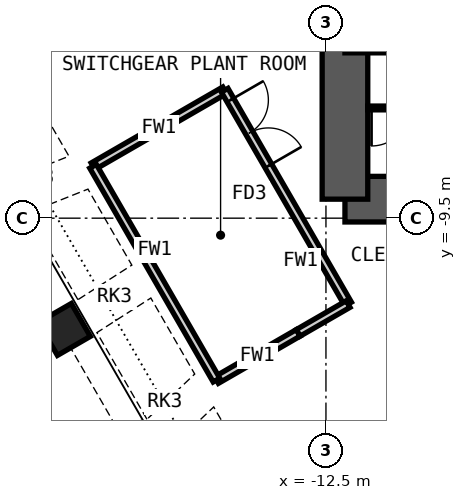
"""IFC4 building model, lengths in metres.
Left out: names, types, materials, properties, quantities, classifications, styles, units other than length and angle.
Written with IfcOpenShell. Run it as: python <this file> out.ifc"""

import sys

from ifc_helpers import new_model, si_unit, direction, frame, frame_2d, origin, origin_2d, place, context, subcontext, project, spatial, rectangle, hollow_rectangle, extrude, clip, halfspace, element, fill, save


model = new_model("IFC4")
c1 = context("Model", 3, precision=1e-05, world=origin(), true_north=direction((0.0, 1.0)))
c2 = subcontext(c1, "Body", "Model", "MODEL_VIEW")
j1 = project(units=[si_unit("LENGTHUNIT", "METRE"), si_unit("PLANEANGLEUNIT", "RADIAN")], contexts=[c1])
p1 = place(None, origin())
s1 = spatial("IfcSite", under=j1, at=p1, CompositionType="ELEMENT")
p2 = place(p1, origin())
s2 = spatial("IfcBuilding", under=s1, at=p2, CompositionType="ELEMENT")
p3 = place(p2, frame((0.0, 0.0, 256.0)))
s3 = spatial("IfcBuildingStorey", under=s2, at=p3, CompositionType="ELEMENT", Elevation=256.0)
p4 = place(p3, frame((-17.566, -15.574, 0.0), z_axis=(0.235339962254, 0.223022528836, 0.94597888655), x_axis=(0.250715543891, 0.9264441464, -0.280789885237)))
e1 = element("IfcColumn", 1, at=p4, inside=s3, PredefinedType="COLUMN", context=c2, shape_type="Clipping", body=[
    clip(clip(extrude(hollow_rectangle(XDim=1.0, YDim=1.0, WallThickness=0.08, at=origin_2d()), origin(), (0.0, 0.0, 1.0), 6.343), halfspace(frame((0.0, 0.0, 0.175), z_axis=(0.0, 0.0, -1.0), x_axis=(0.0, -1.0, 0.0)), False)), halfspace(frame((0.0, 0.0, 6.167), z_axis=(0.0, 0.0, 1.0), x_axis=(0.0, 1.0, 0.0)), False)),
])
p5 = place(p3, frame((-19.383, -12.428, 0.0), z_axis=(0.266443552396, 0.170835747197, 0.948589996187), x_axis=(0.421684474575, 0.864320218179, -0.274103565008)))
e2 = element("IfcColumn", 2, at=p5, inside=s3, PredefinedType="COLUMN", context=c2, shape_type="Clipping", body=[
    clip(clip(extrude(hollow_rectangle(XDim=1.0, YDim=1.0, WallThickness=0.08, at=origin_2d()), origin(), (0.0, 0.0, 1.0), 6.325), halfspace(frame((0.0, 0.0, 0.16), z_axis=(0.0, 0.0, -1.0), x_axis=(0.0, -1.0, 0.0)), False)), halfspace(frame((0.0, 0.0, 6.165), z_axis=(0.0, 0.0, 1.0), x_axis=(0.0, 1.0, 0.0)), False)),
])
p6 = place(p3, frame((-21.2, -9.281, 0.0), z_axis=(0.296649273987, 0.117957900575, 0.947673541857), x_axis=(0.577882690595, 0.767864214795, -0.276470872876)))
e3 = element("IfcColumn", 3, at=p6, inside=s3, PredefinedType="COLUMN", context=c2, shape_type="Clipping", body=[
    clip(clip(extrude(hollow_rectangle(XDim=1.0, YDim=1.0, WallThickness=0.08, at=origin_2d()), origin(), (0.0, 0.0, 1.0), 6.331), halfspace(frame((0.0, 0.0, 0.174), z_axis=(0.0, 0.0, -1.0), x_axis=(0.0, -1.0, 0.0)), False)), halfspace(frame((0.0, 0.0, 6.157), z_axis=(0.0, 0.0, 1.0), x_axis=(0.0, 1.0, 0.0)), False)),
])
p7 = place(p3, frame((-12.0, -9.0, 0.0), z_axis=(0.0, 0.0, 1.0), x_axis=(1.0, 0.0, 0.0)))
e4 = element("IfcWall", 4, at=p7, inside=s3, PredefinedType="SHEAR", context=c2, shape_type="SweptSolid", body=[
    extrude(rectangle(XDim=24.0, YDim=1.2, at=frame_2d((12.0, 0.0))), origin(), (0.0, 0.0, 1.0), 6.0),
])
p8 = place(p7, frame((1.35, 0.0, 0.0)))
e5 = element("IfcOpeningElement", 5, at=p8, cuts=e4, PredefinedType="OPENING", context=c2, shape_type="SweptSolid", body=[
    extrude(rectangle(XDim=1.0, YDim=2.1, at=frame_2d((0.5, 1.05))), frame((0.0, 0.61, 0.0), z_axis=(0.0, -1.0, 0.0), x_axis=(1.0, 0.0, 0.0)), (0.0, 0.0, 1.0), 1.22),
])
p9 = place(p7, frame((5.325, 0.0, 0.0)))
e6 = element("IfcOpeningElement", 6, at=p9, cuts=e4, PredefinedType="OPENING", context=c2, shape_type="SweptSolid", body=[
    extrude(rectangle(XDim=1.15, YDim=2.1, at=frame_2d((0.575, 1.05))), frame((0.0, 0.61, 0.0), z_axis=(0.0, -1.0, 0.0), x_axis=(1.0, 0.0, 0.0)), (0.0, 0.0, 1.0), 1.22),
])
p10 = place(p7, frame((12.6, 0.0, 0.0)))
e7 = element("IfcOpeningElement", 7, at=p10, cuts=e4, PredefinedType="OPENING", context=c2, shape_type="SweptSolid", body=[
    extrude(rectangle(XDim=1.0, YDim=2.1, at=frame_2d((0.5, 1.05))), frame((0.0, 0.61, 0.0), z_axis=(0.0, -1.0, 0.0), x_axis=(1.0, 0.0, 0.0)), (0.0, 0.0, 1.0), 1.22),
])
p11 = place(p3, frame((-12.0, -9.0, 0.0), z_axis=(0.0, 0.0, 1.0), x_axis=(0.0, 1.0, 0.0)))
e8 = element("IfcWall", 8, at=p11, inside=s3, PredefinedType="SHEAR", context=c2, shape_type="SweptSolid", body=[
    extrude(rectangle(XDim=18.0, YDim=1.2, at=frame_2d((9.0, 0.0))), origin(), (0.0, 0.0, 1.0), 6.0),
])
p12 = place(p11, frame((8.1, 0.0, 0.0)))
e9 = element("IfcOpeningElement", 9, at=p12, cuts=e8, PredefinedType="OPENING", context=c2, shape_type="SweptSolid", body=[
    extrude(rectangle(XDim=1.8, YDim=2.1, at=frame_2d((0.9, 1.05))), frame((0.0, 0.61, 0.0), z_axis=(0.0, -1.0, 0.0), x_axis=(1.0, 0.0, 0.0)), (0.0, 0.0, 1.0), 1.22),
])
p13 = place(p3, frame((-12.0, -5.0, 0.0), z_axis=(0.0, 0.0, 1.0), x_axis=(1.0, 0.0, 0.0)))
e10 = element("IfcWall", 10, at=p13, inside=s3, PredefinedType="SHEAR", context=c2, shape_type="SweptSolid", body=[
    extrude(rectangle(XDim=24.0, YDim=0.3, at=frame_2d((12.0, 0.0))), origin(), (0.0, 0.0, 1.0), 6.0),
])
p14 = place(p3, frame((-11.4, -6.6, 0.0), z_axis=(0.0, 0.0, 1.0), x_axis=(1.0, 0.0, 0.0)))
e11 = element("IfcWall", 11, at=p14, inside=s3, PredefinedType="PARTITIONING", context=c2, shape_type="SweptSolid", body=[
    extrude(rectangle(XDim=3.05, YDim=0.1, at=frame_2d((1.525, 0.0))), origin(), (0.0, 0.0, 1.0), 5.78),
])
p15 = place(p14, frame((0.1, 0.0, 0.0)))
e12 = element("IfcOpeningElement", 12, at=p15, cuts=e11, PredefinedType="OPENING", context=c2, shape_type="SweptSolid", body=[
    extrude(rectangle(XDim=1.0, YDim=2.4, at=frame_2d((0.5, 1.2))), frame((0.0, 0.06, 0.0), z_axis=(0.0, -1.0, 0.0), x_axis=(1.0, 0.0, 0.0)), (0.0, 0.0, 1.0), 0.12),
])
p16 = place(p3, frame((-15.381, -13.76, 0.0), z_axis=(0.0, 0.0, 1.0), x_axis=(0.866015417028, 0.50001729717, 0.0)))
e13 = element("IfcWall", 13, at=p16, inside=s3, PredefinedType="PARTITIONING", context=c2, shape_type="SweptSolid", body=[
    extrude(rectangle(XDim=2.485, YDim=0.2, at=frame_2d((1.242, 0.0))), origin(), (0.0, 0.0, 1.0), 4.73),
])
p17 = place(p3, frame((-18.629, -8.134, 0.0), z_axis=(0.0, 0.0, 1.0), x_axis=(0.866026010844, 0.49999894854, 0.0)))
e14 = element("IfcWall", 14, at=p17, inside=s3, PredefinedType="PARTITIONING", context=c2, shape_type="SweptSolid", body=[
    extrude(rectangle(XDim=4.0, YDim=0.2, at=frame_2d((2.0, 0.0))), origin(), (0.0, 0.0, 1.0), 4.73),
])
p18 = place(p3, frame((-11.917, -11.76, 0.0), z_axis=(0.0, 0.0, 1.0), x_axis=(-0.500003318956, 0.866023487576, 0.0)))
e15 = element("IfcWall", 15, at=p18, inside=s3, PredefinedType="PARTITIONING", context=c2, shape_type="SweptSolid", body=[
    extrude(rectangle(XDim=6.496, YDim=0.2, at=frame_2d((3.248, 0.0))), origin(), (0.0, 0.0, 1.0), 5.83),
])
p19 = place(p18, frame((4.197, 0.0, 0.0)))
e16 = element("IfcOpeningElement", 16, at=p19, cuts=e15, PredefinedType="OPENING", context=c2, shape_type="SweptSolid", body=[
    extrude(rectangle(XDim=2.0, YDim=2.4, at=frame_2d((1.0, 1.2))), frame((0.0, 0.11, 0.0), z_axis=(0.0, -1.0, 0.0), x_axis=(1.0, 0.0, 0.0)), (0.0, 0.0, 1.0), 0.22),
])
p20 = place(p3, frame((-15.381, -13.76, 0.0), z_axis=(0.0, 0.0, 1.0), x_axis=(-0.500003318956, 0.866023487576, 0.0)))
e17 = element("IfcWall", 17, at=p20, inside=s3, PredefinedType="PARTITIONING", context=c2, shape_type="SweptSolid", body=[
    extrude(rectangle(XDim=6.496, YDim=0.2, at=frame_2d((3.248, 0.0))), origin(), (0.0, 0.0, 1.0), 5.83),
])
p21 = place(p3, frame((-13.229, -12.518, 0.0), z_axis=(0.0, 0.0, 1.0), x_axis=(0.866043382451, 0.499968858743, 0.0)))
e18 = element("IfcWall", 18, at=p21, inside=s3, PredefinedType="PARTITIONING", context=c2, shape_type="SweptSolid", body=[
    extrude(rectangle(XDim=1.515, YDim=0.2, at=frame_2d((0.758, 0.0))), origin(), (0.0, 0.0, 1.0), 5.83),
])
p22 = place(p15, origin())
e19 = element("IfcDoor", 19, at=p22, inside=s3, OperationType="SINGLE_SWING_LEFT", PredefinedType="DOOR", context=c2, shape_type="SweptSolid", body=[
    extrude(rectangle(XDim=1.0, YDim=2.4, at=frame_2d((0.5, 1.2))), frame((0.0, 0.025, 0.0), z_axis=(0.0, -1.0, 0.0), x_axis=(1.0, 0.0, 0.0)), (0.0, 0.0, 1.0), 0.05),
])
fill(e12, e19)
p23 = place(p19, origin())
e20 = element("IfcDoor", 20, at=p23, inside=s3, OperationType="DOUBLE_DOOR_DOUBLE_SWING", PredefinedType="DOOR", context=c2, shape_type="SweptSolid", body=[
    extrude(rectangle(XDim=2.0, YDim=2.4, at=frame_2d((1.0, 1.2))), frame((0.0, 0.025, 0.0), z_axis=(0.0, -1.0, 0.0), x_axis=(1.0, 0.0, 0.0)), (0.0, 0.0, 1.0), 0.05),
])
fill(e16, e20)
save(model, sys.argv[1])
